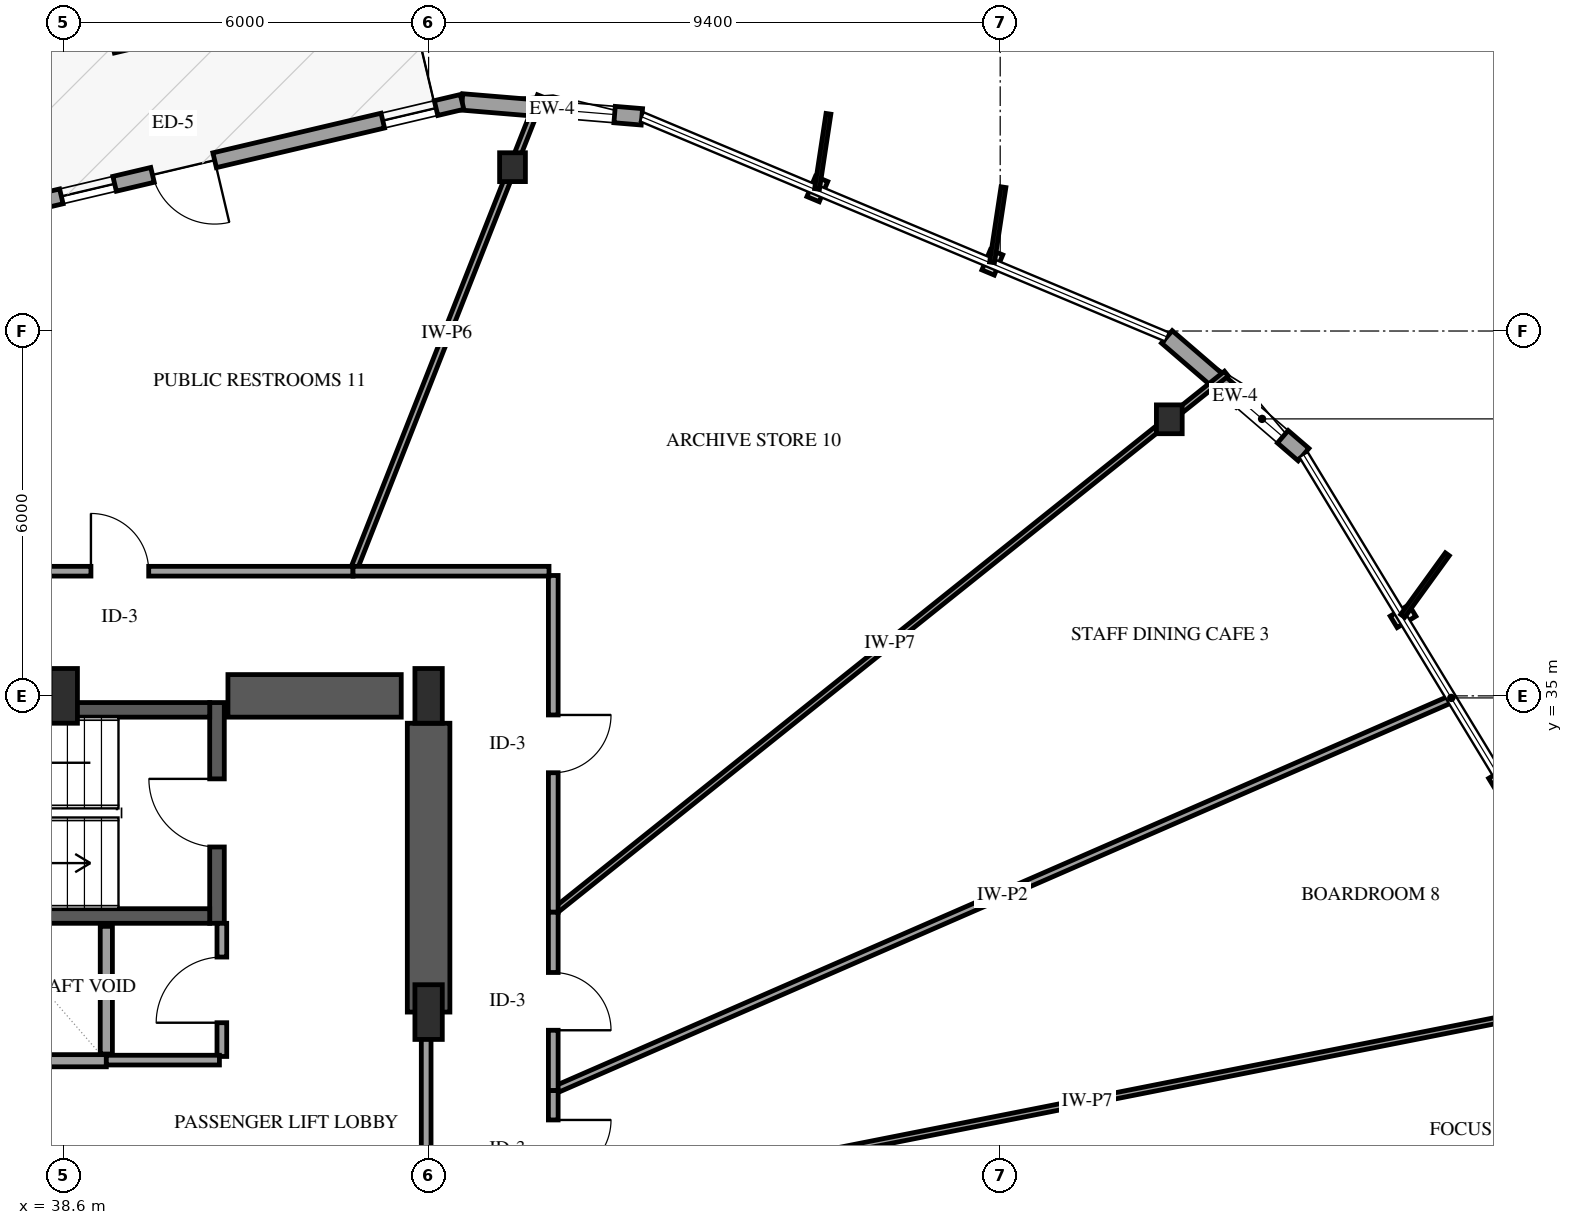
"""IFC4 building model, lengths in metres.
Left out: names, types, materials, properties, quantities, classifications, styles, units other than length and angle.
Written with IfcOpenShell. Run it as: python <this file> out.ifc"""

import sys

from ifc_helpers import new_model, si_unit, direction, frame, frame_2d, origin, origin_2d, place, context, subcontext, project, spatial, rectangle, i_section, extrude, element, fill, save


model = new_model("IFC4")
c1 = context("Model", 3, precision=1e-05, world=origin(), true_north=direction((0.0, 1.0)))
c2 = subcontext(c1, "Body", "Model", "MODEL_VIEW")
j1 = project(units=[si_unit("LENGTHUNIT", "METRE"), si_unit("PLANEANGLEUNIT", "RADIAN")], contexts=[c1])
p1 = place(None, origin())
s1 = spatial("IfcSite", under=j1, at=p1, CompositionType="ELEMENT")
p2 = place(p1, origin())
s2 = spatial("IfcBuilding", under=s1, at=p2, CompositionType="ELEMENT")
p3 = place(p2, frame((0.0, 0.0, 78.6)))
s3 = spatial("IfcBuildingStorey", under=s2, at=p3, CompositionType="ELEMENT", Elevation=78.6)
p4 = place(p3, frame((41.12, 31.26, 0.0), z_axis=(0.0, 0.0, 1.0), x_axis=(0.0, 1.0, 0.0)))
e1 = element("IfcWall", 1, at=p4, inside=s3, PredefinedType="SHEAR", context=c2, shape_type="SweptSolid", body=[
    extrude(rectangle(XDim=3.63, YDim=0.24, at=frame_2d((1.815, 0.0))), origin(), (0.0, 0.0, 1.0), 4.0),
])
p5 = place(p4, frame((1.255, 0.0, 0.0)))
e2 = element("IfcOpeningElement", 2, at=p5, cuts=e1, PredefinedType="OPENING", context=c2, shape_type="SweptSolid", body=[
    extrude(rectangle(XDim=1.12, YDim=2.15, at=frame_2d((0.56, 1.075))), frame((0.0, 0.13, 0.0), z_axis=(0.0, -1.0, 0.0), x_axis=(1.0, 0.0, 0.0)), (0.0, 0.0, 1.0), 0.26),
])
for number, where, z_axis, x_axis in (
    (3, (33.0, 31.38, 0.0), (0.0, 0.0, 1.0), (1.0, 0.0, 0.0)),
    (4, (33.0, 34.77, 0.0), (0.0, 0.0, 1.0), (1.0, 0.0, 0.0)),
):
    element("IfcWall", number, at=place(p3, frame(where, z_axis=z_axis, x_axis=x_axis)), inside=s3, PredefinedType="SHEAR", context=c2, shape_type="SweptSolid", body=[
        extrude(rectangle(XDim=8.0, YDim=0.24, at=frame_2d((4.0, 0.0))), origin(), (0.0, 0.0, 1.0), 4.0),
    ])
p6 = place(p3, frame((41.3, 35.0, 0.0), z_axis=(0.0, 0.0, 1.0), x_axis=(1.0, 0.0, 0.0)))
e5 = element("IfcWall", 5, at=p6, inside=s3, PredefinedType="SHEAR", context=c2, shape_type="SweptSolid", body=[
    extrude(rectangle(XDim=2.85, YDim=0.7, at=frame_2d((1.425, 0.0))), origin(), (0.0, 0.0, 1.0), 4.0),
])
p7 = place(p3, frame((44.6, 29.8, 0.0), z_axis=(0.0, 0.0, 1.0), x_axis=(0.0, 1.0, 0.0)))
e6 = element("IfcWall", 6, at=p7, inside=s3, PredefinedType="SHEAR", context=c2, shape_type="SweptSolid", body=[
    extrude(rectangle(XDim=4.75, YDim=0.7, at=frame_2d((2.375, 0.0))), origin(), (0.0, 0.0, 1.0), 4.0),
])
for number, where, z_axis, x_axis in (
    (7, (38.6, 35.0, 0.0), (0.0, 0.0, 1.0), (1.0, 0.0, 0.0)),
    (8, (44.6, 29.8, 0.0), (0.0, 0.0, 1.0), (1.0, 0.0, 0.0)),
    (9, (44.6, 35.0, 0.0), (0.0, 0.0, 1.0), (1.0, 0.0, 0.0)),
):
    element("IfcColumn", number, at=place(p3, frame(where, z_axis=z_axis, x_axis=x_axis)), inside=s3, PredefinedType="PILASTER", context=c2, shape_type="SweptSolid", body=[
        extrude(rectangle(XDim=0.45, YDim=0.9, at=origin_2d()), origin(), (0.0, 0.0, 1.0), 4.0),
    ])
for number, where, z_axis, x_axis in (
    (10, (56.781, 39.548, 0.0), (0.0, 0.0, 1.0), (1.0, 0.0, 0.0)),
    (11, (45.98, 43.694, 0.0), (0.0, 0.0, 1.0), (1.0, 0.0, 0.0)),
):
    element("IfcColumn", number, at=place(p3, frame(where, z_axis=z_axis, x_axis=x_axis)), inside=s3, PredefinedType="COLUMN", context=c2, shape_type="SweptSolid", body=[
        extrude(i_section(OverallWidth=0.424, OverallDepth=0.474, WebThickness=0.048, FlangeThickness=0.077, FilletRadius=0.038, at=origin_2d()), origin(), (0.0, 0.0, 1.0), 4.0),
    ])
p8 = place(p3, frame((58.989, 38.968, 0.0), z_axis=(0.0, 0.0, 1.0), x_axis=(-0.757662534015, 0.652646523434, 0.0)))
e12 = element("IfcWall", 12, at=p8, inside=s3, PredefinedType="SOLIDWALL", context=c2, shape_type="SweptSolid", body=[
    extrude(rectangle(XDim=2.967, YDim=0.27, at=frame_2d((1.483, 0.0))), origin(), (0.0, 0.0, 1.0), 3.039),
])
p9 = place(p8, frame((0.45, 0.0, 0.75)))
e13 = element("IfcOpeningElement", 13, at=p9, cuts=e12, PredefinedType="OPENING", context=c2, shape_type="SweptSolid", body=[
    extrude(rectangle(XDim=0.9, YDim=1.5, at=frame_2d((0.45, 0.75))), frame((0.0, 0.145, 0.0), z_axis=(0.0, -1.0, 0.0), x_axis=(1.0, 0.0, 0.0)), (0.0, 0.0, 1.0), 0.29),
])
p10 = place(p3, frame((48.107, 44.522, 0.0), z_axis=(0.0, 0.0, 1.0), x_axis=(-0.996580856584, 0.082623218828, 0.0)))
e14 = element("IfcWall", 14, at=p10, inside=s3, PredefinedType="SOLIDWALL", context=c2, shape_type="SweptSolid", body=[
    extrude(rectangle(XDim=2.967, YDim=0.27, at=frame_2d((1.483, 0.0))), origin(), (0.0, 0.0, 1.0), 3.039),
])
p11 = place(p10, frame((0.45, 0.0, 0.75)))
e15 = element("IfcOpeningElement", 15, at=p11, cuts=e14, PredefinedType="OPENING", context=c2, shape_type="SweptSolid", body=[
    extrude(rectangle(XDim=0.9, YDim=1.5, at=frame_2d((0.45, 0.75))), frame((0.0, 0.145, 0.0), z_axis=(0.0, -1.0, 0.0), x_axis=(1.0, 0.0, 0.0)), (0.0, 0.0, 1.0), 0.29),
])
p12 = place(p3, frame((45.151, 44.767, 0.0), z_axis=(0.0, 0.0, 1.0), x_axis=(-0.973339472423, -0.229369290498, 0.0)))
e16 = element("IfcWall", 16, at=p12, inside=s3, PredefinedType="SOLIDWALL", context=c2, shape_type="SweptSolid", body=[
    extrude(rectangle(XDim=9.361, YDim=0.25, at=frame_2d((4.681, 0.0))), origin(), (0.0, 0.0, 1.0), 3.039),
])
p13 = place(p12, frame((4.181, 0.0, 0.0)))
e17 = element("IfcOpeningElement", 17, at=p13, cuts=e16, PredefinedType="OPENING", context=c2, shape_type="SweptSolid", body=[
    extrude(rectangle(XDim=1.05, YDim=2.15, at=frame_2d((0.525, 1.075))), frame((0.0, 0.135, 0.0), z_axis=(0.0, -1.0, 0.0), x_axis=(1.0, 0.0, 0.0)), (0.0, 0.0, 1.0), 0.27),
])
p14 = place(p12, frame((0.44, 0.0, 0.72)))
e18 = element("IfcOpeningElement", 18, at=p14, cuts=e16, PredefinedType="OPENING", context=c2, shape_type="SweptSolid", body=[
    extrude(rectangle(XDim=0.9, YDim=1.5, at=frame_2d((0.45, 0.75))), frame((0.0, 0.135, 0.0), z_axis=(0.0, -1.0, 0.0), x_axis=(1.0, 0.0, 0.0)), (0.0, 0.0, 1.0), 0.27),
])
p15 = place(p12, frame((5.871, 0.0, 0.72)))
e19 = element("IfcOpeningElement", 19, at=p15, cuts=e16, PredefinedType="OPENING", context=c2, shape_type="SweptSolid", body=[
    extrude(rectangle(XDim=0.9, YDim=1.5, at=frame_2d((0.45, 0.75))), frame((0.0, 0.135, 0.0), z_axis=(0.0, -1.0, 0.0), x_axis=(1.0, 0.0, 0.0)), (0.0, 0.0, 1.0), 0.27),
])
p16 = place(p3, frame((37.3, 29.0, 0.0), z_axis=(0.0, 0.0, 1.0), x_axis=(1.0, 0.0, 0.0)))
e20 = element("IfcWall", 20, at=p16, inside=s3, PredefinedType="SOLIDWALL", context=c2, shape_type="SweptSolid", body=[
    extrude(rectangle(XDim=2.0, YDim=0.2, at=frame_2d((1.0, 0.0))), origin(), (0.0, 0.0, 1.0), 3.66),
])
p17 = place(p3, frame((39.3, 29.11, 0.0), z_axis=(0.0, 0.0, 1.0), x_axis=(0.0, 1.0, 0.0)))
e21 = element("IfcWall", 21, at=p17, inside=s3, PredefinedType="SOLIDWALL", context=c2, shape_type="SweptSolid", body=[
    extrude(rectangle(XDim=2.1, YDim=0.2, at=frame_2d((1.05, 0.0))), origin(), (0.0, 0.0, 1.0), 3.66),
])
p18 = place(p3, frame((46.65, 26.593, 0.0), z_axis=(0.0, 0.0, 1.0), x_axis=(0.98097102079, 0.194154207707, 0.0)))
e22 = element("IfcWall", 22, at=p18, inside=s3, PredefinedType="PARTITIONING", context=c2, shape_type="SweptSolid", body=[
    extrude(rectangle(XDim=17.904, YDim=0.1, at=frame_2d((8.952, 0.0))), origin(), (0.0, 0.0, 1.0), 2.955),
])
p19 = place(p3, frame((46.65, 28.509, 0.0), z_axis=(0.0, 0.0, 1.0), x_axis=(0.916650580897, 0.39968952018, 0.0)))
e23 = element("IfcWall", 23, at=p19, inside=s3, PredefinedType="PARTITIONING", context=c2, shape_type="SweptSolid", body=[
    extrude(rectangle(XDim=16.12, YDim=0.12, at=frame_2d((8.06, 0.0))), origin(), (0.0, 0.0, 1.0), 3.66),
])
p20 = place(p3, frame((46.65, 31.442, 0.0), z_axis=(0.0, 0.0, 1.0), x_axis=(0.780803279634, 0.62477695101, 0.0)))
e24 = element("IfcWall", 24, at=p20, inside=s3, PredefinedType="PARTITIONING", context=c2, shape_type="SweptSolid", body=[
    extrude(rectangle(XDim=14.177, YDim=0.1, at=frame_2d((7.088, 0.0))), origin(), (0.0, 0.0, 1.0), 3.66),
])
p21 = place(p3, frame((43.357, 37.05, 0.0), z_axis=(0.0, 0.0, 1.0), x_axis=(0.36721814447, 0.930134847413, 0.0)))
e25 = element("IfcWall", 25, at=p21, inside=s3, PredefinedType="PARTITIONING", context=c2, shape_type="SweptSolid", body=[
    extrude(rectangle(XDim=8.401, YDim=0.11, at=frame_2d((4.2, 0.0))), origin(), (0.0, 0.0, 1.0), 2.955),
])
p22 = place(p3, frame((35.687, 37.05, 0.0), z_axis=(0.0, 0.0, 1.0), x_axis=(1.0, 0.0, 0.0)))
e26 = element("IfcWall", 26, at=p22, inside=s3, PredefinedType="PARTITIONING", context=c2, shape_type="SweptSolid", body=[
    extrude(rectangle(XDim=7.67, YDim=0.16, at=frame_2d((3.835, 0.0))), origin(), (0.0, 0.0, 1.0), 3.66),
])
p23 = place(p22, frame((3.36, 0.0, 0.0)))
e27 = element("IfcOpeningElement", 27, at=p23, cuts=e26, PredefinedType="OPENING", context=c2, shape_type="SweptSolid", body=[
    extrude(rectangle(XDim=0.95, YDim=2.15, at=frame_2d((0.475, 1.075))), frame((0.0, 0.09, 0.0), z_axis=(0.0, -1.0, 0.0), x_axis=(1.0, 0.0, 0.0)), (0.0, 0.0, 1.0), 0.18),
])
p24 = place(p3, frame((44.56, 29.8, 0.0), z_axis=(0.0, 0.0, 1.0), x_axis=(0.0, -1.0, 0.0)))
e28 = element("IfcWall", 28, at=p24, inside=s3, PredefinedType="PARTITIONING", context=c2, shape_type="SweptSolid", body=[
    extrude(rectangle(XDim=6.91, YDim=0.16, at=frame_2d((3.455, 0.0))), origin(), (0.0, 0.0, 1.0), 2.7),
])
p25 = place(p24, frame((2.915, 0.0, 0.0)))
e29 = element("IfcOpeningElement", 29, at=p25, cuts=e28, PredefinedType="OPENING", context=c2, shape_type="SweptSolid", body=[
    extrude(rectangle(XDim=1.08, YDim=2.15, at=frame_2d((0.54, 1.075))), frame((0.0, 0.09, 0.0), z_axis=(0.0, -1.0, 0.0), x_axis=(1.0, 0.0, 0.0)), (0.0, 0.0, 1.0), 0.18),
])
p26 = place(p3, frame((46.65, 36.98, 0.0), z_axis=(0.0, 0.0, 1.0), x_axis=(0.0, -1.0, 0.0)))
e30 = element("IfcWall", 30, at=p26, inside=s3, PredefinedType="PARTITIONING", context=c2, shape_type="SweptSolid", body=[
    extrude(rectangle(XDim=5.538, YDim=0.16, at=frame_2d((2.769, 0.0))), origin(), (0.0, 0.0, 1.0), 3.66),
])
p27 = place(p26, frame((2.294, 0.0, 0.0)))
e31 = element("IfcOpeningElement", 31, at=p27, cuts=e30, PredefinedType="OPENING", context=c2, shape_type="SweptSolid", body=[
    extrude(rectangle(XDim=0.95, YDim=2.15, at=frame_2d((0.475, 1.075))), frame((0.0, 0.09, 0.0), z_axis=(0.0, -1.0, 0.0), x_axis=(1.0, 0.0, 0.0)), (0.0, 0.0, 1.0), 0.18),
])
p28 = place(p3, frame((43.357, 37.05, 0.0), z_axis=(0.0, 0.0, 1.0), x_axis=(1.0, 0.0, 0.0)))
e32 = element("IfcWall", 32, at=p28, inside=s3, PredefinedType="PARTITIONING", context=c2, shape_type="SweptSolid", body=[
    extrude(rectangle(XDim=3.223, YDim=0.16, at=frame_2d((1.612, 0.0))), origin(), (0.0, 0.0, 1.0), 3.66),
])
p29 = place(p3, frame((46.65, 31.442, 0.0), z_axis=(0.0, 0.0, 1.0), x_axis=(0.0, -1.0, 0.0)))
e33 = element("IfcWall", 33, at=p29, inside=s3, PredefinedType="PARTITIONING", context=c2, shape_type="SweptSolid", body=[
    extrude(rectangle(XDim=2.933, YDim=0.16, at=frame_2d((1.466, 0.0))), origin(), (0.0, 0.0, 1.0), 3.66),
])
p30 = place(p29, frame((0.991, 0.0, 0.0)))
e34 = element("IfcOpeningElement", 34, at=p30, cuts=e33, PredefinedType="OPENING", context=c2, shape_type="SweptSolid", body=[
    extrude(rectangle(XDim=0.95, YDim=2.15, at=frame_2d((0.475, 1.075))), frame((0.0, 0.09, 0.0), z_axis=(0.0, -1.0, 0.0), x_axis=(1.0, 0.0, 0.0)), (0.0, 0.0, 1.0), 0.18),
])
p31 = place(p3, frame((41.2, 29.07, 0.0), z_axis=(0.0, 0.0, 1.0), x_axis=(0.0, 1.0, 0.0)))
e35 = element("IfcWall", 35, at=p31, inside=s3, PredefinedType="PARTITIONING", context=c2, shape_type="SweptSolid", body=[
    extrude(rectangle(XDim=2.19, YDim=0.16, at=frame_2d((1.095, 0.0))), origin(), (0.0, 0.0, 1.0), 3.66),
])
p32 = place(p31, frame((0.555, 0.0, 0.0)))
e36 = element("IfcOpeningElement", 36, at=p32, cuts=e35, PredefinedType="OPENING", context=c2, shape_type="SweptSolid", body=[
    extrude(rectangle(XDim=1.08, YDim=2.15, at=frame_2d((0.54, 1.075))), frame((0.0, 0.09, 0.0), z_axis=(0.0, -1.0, 0.0), x_axis=(1.0, 0.0, 0.0)), (0.0, 0.0, 1.0), 0.18),
])
p33 = place(p3, frame((46.65, 28.509, 0.0), z_axis=(0.0, 0.0, 1.0), x_axis=(0.0, -1.0, 0.0)))
e37 = element("IfcWall", 37, at=p33, inside=s3, PredefinedType="PARTITIONING", context=c2, shape_type="SweptSolid", body=[
    extrude(rectangle(XDim=1.916, YDim=0.16, at=frame_2d((0.958, 0.0))), origin(), (0.0, 0.0, 1.0), 3.66),
])
p34 = place(p33, frame((0.483, 0.0, 0.0)))
e38 = element("IfcOpeningElement", 38, at=p34, cuts=e37, PredefinedType="OPENING", context=c2, shape_type="SweptSolid", body=[
    extrude(rectangle(XDim=0.95, YDim=2.15, at=frame_2d((0.475, 1.075))), frame((0.0, 0.09, 0.0), z_axis=(0.0, -1.0, 0.0), x_axis=(1.0, 0.0, 0.0)), (0.0, 0.0, 1.0), 0.18),
])
p35 = place(p3, frame((39.3, 29.01, 0.0), z_axis=(0.0, 0.0, 1.0), x_axis=(1.0, 0.0, 0.0)))
e39 = element("IfcWall", 39, at=p35, inside=s3, PredefinedType="PARTITIONING", context=c2, shape_type="SweptSolid", body=[
    extrude(rectangle(XDim=1.86, YDim=0.16, at=frame_2d((0.93, 0.0))), origin(), (0.0, 0.0, 1.0), 3.66),
])
p36 = place(p9, origin())
e40 = element("IfcWindow", 40, at=p36, inside=s3, PartitioningType="SINGLE_PANEL", PredefinedType="WINDOW", context=c2, shape_type="SweptSolid", body=[
    extrude(rectangle(XDim=0.9, YDim=1.5, at=frame_2d((0.45, 0.75))), frame((0.0, 0.03, 0.0), z_axis=(0.0, -1.0, 0.0), x_axis=(1.0, 0.0, 0.0)), (0.0, 0.0, 1.0), 0.06),
])
fill(e13, e40)
p37 = place(p11, origin())
e41 = element("IfcWindow", 41, at=p37, inside=s3, PartitioningType="SINGLE_PANEL", PredefinedType="WINDOW", context=c2, shape_type="SweptSolid", body=[
    extrude(rectangle(XDim=0.9, YDim=1.5, at=frame_2d((0.45, 0.75))), frame((0.0, 0.03, 0.0), z_axis=(0.0, -1.0, 0.0), x_axis=(1.0, 0.0, 0.0)), (0.0, 0.0, 1.0), 0.06),
])
fill(e15, e41)
p38 = place(p13, origin())
e42 = element("IfcDoor", 42, at=p38, inside=s3, OperationType="SINGLE_SWING_LEFT", PredefinedType="DOOR", context=c2, shape_type="SweptSolid", body=[
    extrude(rectangle(XDim=1.05, YDim=2.15, at=frame_2d((0.525, 1.075))), frame((0.0, 0.025, 0.0), z_axis=(0.0, -1.0, 0.0), x_axis=(1.0, 0.0, 0.0)), (0.0, 0.0, 1.0), 0.05),
])
fill(e17, e42)
p39 = place(p14, origin())
e43 = element("IfcWindow", 43, at=p39, inside=s3, PartitioningType="SINGLE_PANEL", PredefinedType="WINDOW", context=c2, shape_type="SweptSolid", body=[
    extrude(rectangle(XDim=0.9, YDim=1.5, at=frame_2d((0.45, 0.75))), frame((0.0, 0.03, 0.0), z_axis=(0.0, -1.0, 0.0), x_axis=(1.0, 0.0, 0.0)), (0.0, 0.0, 1.0), 0.06),
])
fill(e18, e43)
p40 = place(p15, origin())
e44 = element("IfcWindow", 44, at=p40, inside=s3, PartitioningType="SINGLE_PANEL", PredefinedType="WINDOW", context=c2, shape_type="SweptSolid", body=[
    extrude(rectangle(XDim=0.9, YDim=1.5, at=frame_2d((0.45, 0.75))), frame((0.0, 0.03, 0.0), z_axis=(0.0, -1.0, 0.0), x_axis=(1.0, 0.0, 0.0)), (0.0, 0.0, 1.0), 0.06),
])
fill(e19, e44)
p41 = place(p5, origin())
e45 = element("IfcDoor", 45, at=p41, inside=s3, OperationType="SINGLE_SWING_RIGHT", PredefinedType="DOOR", context=c2, shape_type="SweptSolid", body=[
    extrude(rectangle(XDim=1.12, YDim=2.15, at=frame_2d((0.56, 1.075))), frame((0.0, 0.025, 0.0), z_axis=(0.0, -1.0, 0.0), x_axis=(1.0, 0.0, 0.0)), (0.0, 0.0, 1.0), 0.05),
])
fill(e2, e45)
p42 = place(p23, origin())
e46 = element("IfcDoor", 46, at=p42, inside=s3, OperationType="SINGLE_SWING_LEFT", PredefinedType="DOOR", context=c2, shape_type="SweptSolid", body=[
    extrude(rectangle(XDim=0.95, YDim=2.15, at=frame_2d((0.475, 1.075))), frame((0.0, 0.025, 0.0), z_axis=(0.0, -1.0, 0.0), x_axis=(1.0, 0.0, 0.0)), (0.0, 0.0, 1.0), 0.05),
])
fill(e27, e46)
p43 = place(p27, origin())
e47 = element("IfcDoor", 47, at=p43, inside=s3, OperationType="SINGLE_SWING_LEFT", PredefinedType="DOOR", context=c2, shape_type="SweptSolid", body=[
    extrude(rectangle(XDim=0.95, YDim=2.15, at=frame_2d((0.475, 1.075))), frame((0.0, 0.025, 0.0), z_axis=(0.0, -1.0, 0.0), x_axis=(1.0, 0.0, 0.0)), (0.0, 0.0, 1.0), 0.05),
])
fill(e31, e47)
p44 = place(p30, origin())
e48 = element("IfcDoor", 48, at=p44, inside=s3, OperationType="SINGLE_SWING_RIGHT", PredefinedType="DOOR", context=c2, shape_type="SweptSolid", body=[
    extrude(rectangle(XDim=0.95, YDim=2.15, at=frame_2d((0.475, 1.075))), frame((0.0, 0.025, 0.0), z_axis=(0.0, -1.0, 0.0), x_axis=(1.0, 0.0, 0.0)), (0.0, 0.0, 1.0), 0.05),
])
fill(e34, e48)
p45 = place(p32, origin())
e49 = element("IfcDoor", 49, at=p45, inside=s3, OperationType="SINGLE_SWING_LEFT", PredefinedType="DOOR", context=c2, shape_type="SweptSolid", body=[
    extrude(rectangle(XDim=1.08, YDim=2.15, at=frame_2d((0.54, 1.075))), frame((0.0, 0.025, 0.0), z_axis=(0.0, -1.0, 0.0), x_axis=(1.0, 0.0, 0.0)), (0.0, 0.0, 1.0), 0.05),
])
fill(e36, e49)
p46 = place(p34, origin())
e50 = element("IfcDoor", 50, at=p46, inside=s3, OperationType="SINGLE_SWING_LEFT", PredefinedType="DOOR", context=c2, shape_type="SweptSolid", body=[
    extrude(rectangle(XDim=0.95, YDim=2.15, at=frame_2d((0.475, 1.075))), frame((0.0, 0.025, 0.0), z_axis=(0.0, -1.0, 0.0), x_axis=(1.0, 0.0, 0.0)), (0.0, 0.0, 1.0), 0.05),
])
fill(e38, e50)
save(model, sys.argv[1])
